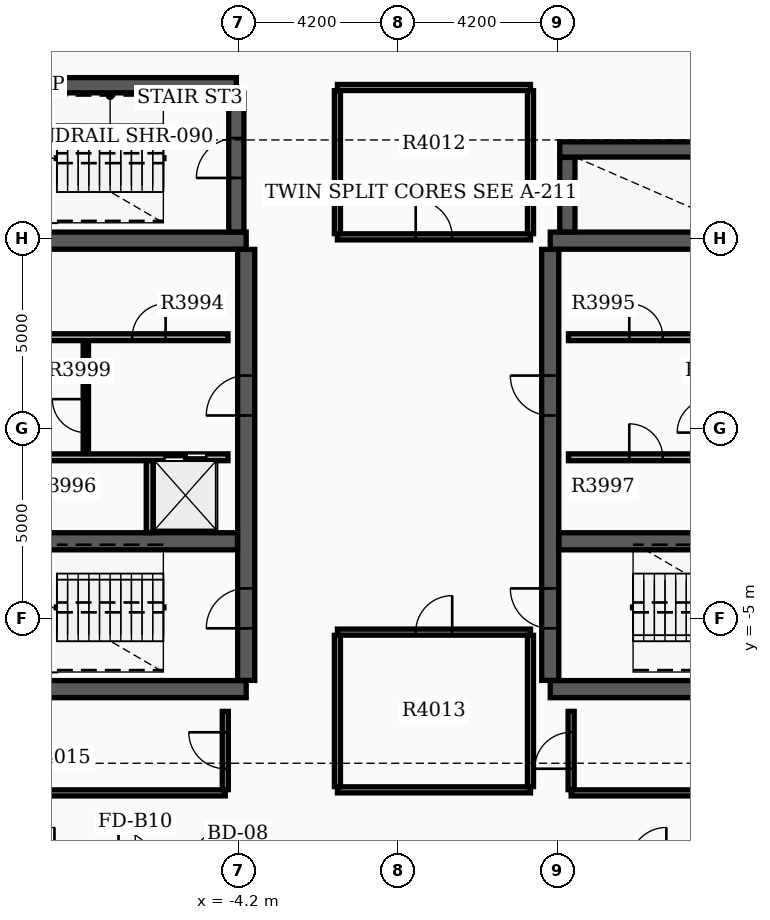
"""IFC4 building model, lengths in metres.
Left out: names, types, materials, properties, quantities, classifications, styles, units other than length and angle.
Written with IfcOpenShell. Run it as: python <this file> out.ifc"""

import sys

from ifc_helpers import new_model, si_unit, direction, frame, frame_2d, origin, place, context, subcontext, project, spatial, rectangle, extrude, element, fill, save


model = new_model("IFC4")
c1 = context("Model", 3, precision=1e-05, world=origin(), true_north=direction((0.0, 1.0)))
c2 = subcontext(c1, "Body", "Model", "MODEL_VIEW")
j1 = project(units=[si_unit("LENGTHUNIT", "METRE"), si_unit("PLANEANGLEUNIT", "RADIAN")], contexts=[c1])
p1 = place(None, origin())
s1 = spatial("IfcSite", under=j1, at=p1, CompositionType="ELEMENT")
p2 = place(p1, origin())
s2 = spatial("IfcBuilding", under=s1, at=p2, CompositionType="ELEMENT")
p3 = place(p2, frame((0.0, 0.0, 253.8)))
s3 = spatial("IfcBuildingStorey", under=s2, at=p3, CompositionType="ELEMENT", Elevation=253.8)
for number, where, z_axis, x_axis in (
    (1, (-12.4, -6.85, 0.0), (0.0, 0.0, 1.0), (1.0, 0.0, 0.0)),
    (2, (-12.4, 4.95, 0.0), (0.0, 0.0, 1.0), (1.0, 0.0, 0.0)),
):
    element("IfcWall", number, at=place(p3, frame(where, z_axis=z_axis, x_axis=x_axis)), inside=s3, PredefinedType="SHEAR", context=c2, shape_type="SweptSolid", body=[
        extrude(rectangle(XDim=8.4, YDim=0.45, at=frame_2d((4.2, 0.0))), origin(), (0.0, 0.0, 1.0), 3.7),
    ])
p4 = place(p3, frame((-4.0, -6.62, 0.0), z_axis=(0.0, 0.0, 1.0), x_axis=(0.0, 1.0, 0.0)))
e3 = element("IfcWall", 3, at=p4, inside=s3, PredefinedType="SHEAR", context=c2, shape_type="SweptSolid", body=[
    extrude(rectangle(XDim=11.34, YDim=0.45, at=frame_2d((5.67, 0.0))), origin(), (0.0, 0.0, 1.0), 3.7),
])
p5 = place(p4, frame((1.37, 0.0, 0.0)))
e4 = element("IfcOpeningElement", 4, at=p5, cuts=e3, PredefinedType="OPENING", context=c2, shape_type="SweptSolid", body=[
    extrude(rectangle(XDim=1.05, YDim=2.15, at=frame_2d((0.525, 1.075))), frame((0.0, 0.235, 0.0), z_axis=(0.0, -1.0, 0.0), x_axis=(1.0, 0.0, 0.0)), (0.0, 0.0, 1.0), 0.47),
])
p6 = place(p4, frame((6.97, 0.0, 0.0)))
e5 = element("IfcOpeningElement", 5, at=p6, cuts=e3, PredefinedType="OPENING", context=c2, shape_type="SweptSolid", body=[
    extrude(rectangle(XDim=1.05, YDim=2.15, at=frame_2d((0.525, 1.075))), frame((0.0, 0.235, 0.0), z_axis=(0.0, -1.0, 0.0), x_axis=(1.0, 0.0, 0.0)), (0.0, 0.0, 1.0), 0.47),
])
p7 = place(p3, frame((-12.17, -2.96, 0.0), z_axis=(0.0, 0.0, 1.0), x_axis=(1.0, 0.0, 0.0)))
e6 = element("IfcWall", 6, at=p7, inside=s3, PredefinedType="SHEAR", context=c2, shape_type="SweptSolid", body=[
    extrude(rectangle(XDim=7.94, YDim=0.45, at=frame_2d((3.97, 0.0))), origin(), (0.0, 0.0, 1.0), 3.7),
])
for number, where, z_axis, x_axis in (
    (7, (4.0, -6.85, 0.0), (0.0, 0.0, 1.0), (1.0, 0.0, 0.0)),
    (8, (4.0, 4.95, 0.0), (0.0, 0.0, 1.0), (1.0, 0.0, 0.0)),
):
    element("IfcWall", number, at=place(p3, frame(where, z_axis=z_axis, x_axis=x_axis)), inside=s3, PredefinedType="SHEAR", context=c2, shape_type="SweptSolid", body=[
        extrude(rectangle(XDim=8.4, YDim=0.45, at=frame_2d((4.2, 0.0))), origin(), (0.0, 0.0, 1.0), 3.7),
    ])
p8 = place(p3, frame((4.0, -6.62, 0.0), z_axis=(0.0, 0.0, 1.0), x_axis=(0.0, 1.0, 0.0)))
e9 = element("IfcWall", 9, at=p8, inside=s3, PredefinedType="SHEAR", context=c2, shape_type="SweptSolid", body=[
    extrude(rectangle(XDim=11.34, YDim=0.45, at=frame_2d((5.67, 0.0))), origin(), (0.0, 0.0, 1.0), 3.7),
])
p9 = place(p8, frame((1.37, 0.0, 0.0)))
e10 = element("IfcOpeningElement", 10, at=p9, cuts=e9, PredefinedType="OPENING", context=c2, shape_type="SweptSolid", body=[
    extrude(rectangle(XDim=1.05, YDim=2.15, at=frame_2d((0.525, 1.075))), frame((0.0, 0.235, 0.0), z_axis=(0.0, -1.0, 0.0), x_axis=(1.0, 0.0, 0.0)), (0.0, 0.0, 1.0), 0.47),
])
p10 = place(p8, frame((6.97, 0.0, 0.0)))
e11 = element("IfcOpeningElement", 11, at=p10, cuts=e9, PredefinedType="OPENING", context=c2, shape_type="SweptSolid", body=[
    extrude(rectangle(XDim=1.05, YDim=2.15, at=frame_2d((0.525, 1.075))), frame((0.0, 0.235, 0.0), z_axis=(0.0, -1.0, 0.0), x_axis=(1.0, 0.0, 0.0)), (0.0, 0.0, 1.0), 0.47),
])
p11 = place(p3, frame((4.23, -2.96, 0.0), z_axis=(0.0, 0.0, 1.0), x_axis=(1.0, 0.0, 0.0)))
e12 = element("IfcWall", 12, at=p11, inside=s3, PredefinedType="SHEAR", context=c2, shape_type="SweptSolid", body=[
    extrude(rectangle(XDim=7.94, YDim=0.45, at=frame_2d((3.97, 0.0))), origin(), (0.0, 0.0, 1.0), 3.7),
])
p12 = place(p3, frame((-12.22, 9.04, 0.0), z_axis=(0.0, 0.0, 1.0), x_axis=(1.0, 0.0, 0.0)))
e13 = element("IfcWall", 13, at=p12, inside=s3, PredefinedType="SHEAR", context=c2, shape_type="SweptSolid", body=[
    extrude(rectangle(XDim=7.96, YDim=0.4, at=frame_2d((3.98, 0.0))), origin(), (0.0, 0.0, 1.0), 3.7),
])
p13 = place(p3, frame((-4.26, 5.18, 0.0), z_axis=(0.0, 0.0, 1.0), x_axis=(0.0, 1.0, 0.0)))
e14 = element("IfcWall", 14, at=p13, inside=s3, PredefinedType="SHEAR", context=c2, shape_type="SweptSolid", body=[
    extrude(rectangle(XDim=3.655, YDim=0.4, at=frame_2d((1.828, 0.0))), origin(), (0.0, 0.0, 1.0), 3.7),
])
p14 = place(p13, frame((1.42, 0.0, 0.0)))
e15 = element("IfcOpeningElement", 15, at=p14, cuts=e14, PredefinedType="OPENING", context=c2, shape_type="SweptSolid", body=[
    extrude(rectangle(XDim=1.05, YDim=2.15, at=frame_2d((0.525, 1.075))), frame((0.0, 0.21, 0.0), z_axis=(0.0, -1.0, 0.0), x_axis=(1.0, 0.0, 0.0)), (0.0, 0.0, 1.0), 0.42),
])
p15 = place(p3, frame((4.45, 5.18, 0.0), z_axis=(0.0, 0.0, 1.0), x_axis=(0.0, 1.0, 0.0)))
e16 = element("IfcWall", 16, at=p15, inside=s3, PredefinedType="SHEAR", context=c2, shape_type="SweptSolid", body=[
    extrude(rectangle(XDim=1.96, YDim=0.4, at=frame_2d((0.98, 0.0))), origin(), (0.0, 0.0, 1.0), 3.7),
])
p16 = place(p3, frame((4.25, 7.35, 0.0), z_axis=(0.0, 0.0, 1.0), x_axis=(1.0, 0.0, 0.0)))
e17 = element("IfcWall", 17, at=p16, inside=s3, PredefinedType="SHEAR", context=c2, shape_type="SweptSolid", body=[
    extrude(rectangle(XDim=5.4, YDim=0.4, at=frame_2d((2.7, 0.0))), origin(), (0.0, 0.0, 1.0), 3.7),
])
p17 = place(p3, frame((-11.9, 2.41, 0.0), z_axis=(0.0, 0.0, 1.0), x_axis=(1.0, 0.0, 0.0)))
e18 = element("IfcWall", 18, at=p17, inside=s3, PredefinedType="SOLIDWALL", context=c2, shape_type="SweptSolid", body=[
    extrude(rectangle(XDim=7.42, YDim=0.18, at=frame_2d((3.71, 0.0))), origin(), (0.0, 0.0, 1.0), 3.17),
])
p18 = place(p17, frame((0.55, 0.0, 0.0)))
e19 = element("IfcOpeningElement", 19, at=p18, cuts=e18, PredefinedType="OPENING", context=c2, shape_type="SweptSolid", body=[
    extrude(rectangle(XDim=1.1, YDim=2.15, at=frame_2d((0.55, 1.075))), frame((0.0, 0.1, 0.0), z_axis=(0.0, -1.0, 0.0), x_axis=(1.0, 0.0, 0.0)), (0.0, 0.0, 1.0), 0.2),
])
p19 = place(p17, frame((4.9, 0.0, 0.0)))
e20 = element("IfcOpeningElement", 20, at=p19, cuts=e18, PredefinedType="OPENING", context=c2, shape_type="SweptSolid", body=[
    extrude(rectangle(XDim=0.88, YDim=2.1, at=frame_2d((0.44, 1.05))), frame((0.0, 0.1, 0.0), z_axis=(0.0, -1.0, 0.0), x_axis=(1.0, 0.0, 0.0)), (0.0, 0.0, 1.0), 0.2),
])
p20 = place(p3, frame((4.48, 2.41, 0.0), z_axis=(0.0, 0.0, 1.0), x_axis=(1.0, 0.0, 0.0)))
e21 = element("IfcWall", 21, at=p20, inside=s3, PredefinedType="SOLIDWALL", context=c2, shape_type="SweptSolid", body=[
    extrude(rectangle(XDim=7.42, YDim=0.18, at=frame_2d((3.71, 0.0))), origin(), (0.0, 0.0, 1.0), 3.17),
])
p21 = place(p20, frame((5.67, 0.0, 0.0)))
e22 = element("IfcOpeningElement", 22, at=p21, cuts=e21, PredefinedType="OPENING", context=c2, shape_type="SweptSolid", body=[
    extrude(rectangle(XDim=1.1, YDim=2.15, at=frame_2d((0.55, 1.075))), frame((0.0, 0.1, 0.0), z_axis=(0.0, -1.0, 0.0), x_axis=(1.0, 0.0, 0.0)), (0.0, 0.0, 1.0), 0.2),
])
p22 = place(p20, frame((1.6, 0.0, 0.0)))
e23 = element("IfcOpeningElement", 23, at=p22, cuts=e21, PredefinedType="OPENING", context=c2, shape_type="SweptSolid", body=[
    extrude(rectangle(XDim=0.88, YDim=2.1, at=frame_2d((0.44, 1.05))), frame((0.0, 0.1, 0.0), z_axis=(0.0, -1.0, 0.0), x_axis=(1.0, 0.0, 0.0)), (0.0, 0.0, 1.0), 0.2),
])
p23 = place(p3, frame((-11.9, -0.75, 0.0), z_axis=(0.0, 0.0, 1.0), x_axis=(1.0, 0.0, 0.0)))
e24 = element("IfcWall", 24, at=p23, inside=s3, PredefinedType="SOLIDWALL", context=c2, shape_type="SweptSolid", body=[
    extrude(rectangle(XDim=7.42, YDim=0.18, at=frame_2d((3.71, 0.0))), origin(), (0.0, 0.0, 1.0), 3.17),
])
p24 = place(p23, frame((5.75, 0.0, 0.0)))
e25 = element("IfcOpeningElement", 25, at=p24, cuts=e24, PredefinedType="OPENING", context=c2, shape_type="SweptSolid", body=[
    extrude(rectangle(XDim=1.1, YDim=2.15, at=frame_2d((0.55, 1.075))), frame((0.0, 0.1, 0.0), z_axis=(0.0, -1.0, 0.0), x_axis=(1.0, 0.0, 0.0)), (0.0, 0.0, 1.0), 0.2),
])
p25 = place(p23, frame((1.6, 0.0, 0.0)))
e26 = element("IfcOpeningElement", 26, at=p25, cuts=e24, PredefinedType="OPENING", context=c2, shape_type="SweptSolid", body=[
    extrude(rectangle(XDim=0.88, YDim=2.1, at=frame_2d((0.44, 1.05))), frame((0.0, 0.1, 0.0), z_axis=(0.0, -1.0, 0.0), x_axis=(1.0, 0.0, 0.0)), (0.0, 0.0, 1.0), 0.2),
])
p26 = place(p3, frame((4.48, -0.75, 0.0), z_axis=(0.0, 0.0, 1.0), x_axis=(1.0, 0.0, 0.0)))
e27 = element("IfcWall", 27, at=p26, inside=s3, PredefinedType="SOLIDWALL", context=c2, shape_type="SweptSolid", body=[
    extrude(rectangle(XDim=7.42, YDim=0.18, at=frame_2d((3.71, 0.0))), origin(), (0.0, 0.0, 1.0), 3.17),
])
p27 = place(p26, frame((3.92, 0.0, 0.0)))
e28 = element("IfcOpeningElement", 28, at=p27, cuts=e27, PredefinedType="OPENING", context=c2, shape_type="SweptSolid", body=[
    extrude(rectangle(XDim=1.1, YDim=2.15, at=frame_2d((0.55, 1.075))), frame((0.0, 0.1, 0.0), z_axis=(0.0, -1.0, 0.0), x_axis=(1.0, 0.0, 0.0)), (0.0, 0.0, 1.0), 0.2),
])
p28 = place(p26, frame((5.82, 0.0, 0.0)))
e29 = element("IfcOpeningElement", 29, at=p28, cuts=e27, PredefinedType="OPENING", context=c2, shape_type="SweptSolid", body=[
    extrude(rectangle(XDim=1.1, YDim=2.15, at=frame_2d((0.55, 1.075))), frame((0.0, 0.1, 0.0), z_axis=(0.0, -1.0, 0.0), x_axis=(1.0, 0.0, 0.0)), (0.0, 0.0, 1.0), 0.2),
])
p29 = place(p26, frame((1.6, 0.0, 0.0)))
e30 = element("IfcOpeningElement", 30, at=p29, cuts=e27, PredefinedType="OPENING", context=c2, shape_type="SweptSolid", body=[
    extrude(rectangle(XDim=0.88, YDim=2.1, at=frame_2d((0.44, 1.05))), frame((0.0, 0.1, 0.0), z_axis=(0.0, -1.0, 0.0), x_axis=(1.0, 0.0, 0.0)), (0.0, 0.0, 1.0), 0.2),
])
p30 = place(p3, frame((-6.54, -2.73, 0.0), z_axis=(0.0, 0.0, 1.0), x_axis=(0.0, 1.0, 0.0)))
e31 = element("IfcWall", 31, at=p30, inside=s3, PredefinedType="SOLIDWALL", context=c2, shape_type="SweptSolid", body=[
    extrude(rectangle(XDim=1.89, YDim=0.18, at=frame_2d((0.945, 0.0))), origin(), (0.0, 0.0, 1.0), 3.17),
])
p31 = place(p3, frame((-8.22, -0.65, 0.0), z_axis=(0.0, 0.0, 1.0), x_axis=(0.0, 1.0, 0.0)))
e32 = element("IfcWall", 32, at=p31, inside=s3, PredefinedType="SOLIDWALL", context=c2, shape_type="SweptSolid", body=[
    extrude(rectangle(XDim=2.96, YDim=0.14, at=frame_2d((1.48, 0.0))), origin(), (0.0, 0.0, 1.0), 3.17),
])
p32 = place(p31, frame((0.55, 0.0, 0.0)))
e33 = element("IfcOpeningElement", 33, at=p32, cuts=e32, PredefinedType="OPENING", context=c2, shape_type="SweptSolid", body=[
    extrude(rectangle(XDim=0.88, YDim=2.1, at=frame_2d((0.44, 1.05))), frame((0.0, 0.08, 0.0), z_axis=(0.0, -1.0, 0.0), x_axis=(1.0, 0.0, 0.0)), (0.0, 0.0, 1.0), 0.16),
])
p33 = place(p3, frame((-1.6, 5.05, 0.0), z_axis=(0.0, 0.0, 1.0), x_axis=(1.0, 0.0, 0.0)))
e34 = element("IfcWall", 34, at=p33, inside=s3, PredefinedType="PARTITIONING", context=c2, shape_type="SweptSolid", body=[
    extrude(rectangle(XDim=5.08, YDim=0.16, at=frame_2d((2.54, 0.0))), origin(), (0.0, 0.0, 1.0), 3.17),
])
p34 = place(p33, frame((2.06, 0.0, 0.0)))
e35 = element("IfcOpeningElement", 35, at=p34, cuts=e34, PredefinedType="OPENING", context=c2, shape_type="SweptSolid", body=[
    extrude(rectangle(XDim=0.96, YDim=2.15, at=frame_2d((0.48, 1.075))), frame((0.0, 0.09, 0.0), z_axis=(0.0, -1.0, 0.0), x_axis=(1.0, 0.0, 0.0)), (0.0, 0.0, 1.0), 0.18),
])
p35 = place(p3, frame((-1.6, 8.98, 0.0), z_axis=(0.0, 0.0, 1.0), x_axis=(1.0, 0.0, 0.0)))
e36 = element("IfcWall", 36, at=p35, inside=s3, PredefinedType="PARTITIONING", context=c2, shape_type="SweptSolid", body=[
    extrude(rectangle(XDim=5.08, YDim=0.16, at=frame_2d((2.54, 0.0))), origin(), (0.0, 0.0, 1.0), 3.17),
])
for number, where, z_axis, x_axis in (
    (37, (-1.6, 5.135, 0.0), (0.0, 0.0, 1.0), (0.0, 1.0, 0.0)),
    (38, (3.48, 5.135, 0.0), (0.0, 0.0, 1.0), (0.0, 1.0, 0.0)),
):
    element("IfcWall", number, at=place(p3, frame(where, z_axis=z_axis, x_axis=x_axis)), inside=s3, PredefinedType="PARTITIONING", context=c2, shape_type="SweptSolid", body=[
        extrude(rectangle(XDim=3.76, YDim=0.16, at=frame_2d((1.88, 0.0))), origin(), (0.0, 0.0, 1.0), 3.17),
    ])
p36 = place(p3, frame((-1.6, -9.5, 0.0), z_axis=(0.0, 0.0, 1.0), x_axis=(1.0, 0.0, 0.0)))
e39 = element("IfcWall", 39, at=p36, inside=s3, PredefinedType="PARTITIONING", context=c2, shape_type="SweptSolid", body=[
    extrude(rectangle(XDim=5.08, YDim=0.16, at=frame_2d((2.54, 0.0))), origin(), (0.0, 0.0, 1.0), 3.17),
])
p37 = place(p3, frame((-1.6, -5.35, 0.0), z_axis=(0.0, 0.0, 1.0), x_axis=(1.0, 0.0, 0.0)))
e40 = element("IfcWall", 40, at=p37, inside=s3, PredefinedType="PARTITIONING", context=c2, shape_type="SweptSolid", body=[
    extrude(rectangle(XDim=5.08, YDim=0.16, at=frame_2d((2.54, 0.0))), origin(), (0.0, 0.0, 1.0), 3.17),
])
p38 = place(p37, frame((2.06, 0.0, 0.0)))
e41 = element("IfcOpeningElement", 41, at=p38, cuts=e40, PredefinedType="OPENING", context=c2, shape_type="SweptSolid", body=[
    extrude(rectangle(XDim=0.96, YDim=2.15, at=frame_2d((0.48, 1.075))), frame((0.0, 0.09, 0.0), z_axis=(0.0, -1.0, 0.0), x_axis=(1.0, 0.0, 0.0)), (0.0, 0.0, 1.0), 0.18),
])
for number, where, z_axis, x_axis in (
    (42, (-1.6, -9.415, 0.0), (0.0, 0.0, 1.0), (0.0, 1.0, 0.0)),
    (43, (3.48, -9.415, 0.0), (0.0, 0.0, 1.0), (0.0, 1.0, 0.0)),
):
    element("IfcWall", number, at=place(p3, frame(where, z_axis=z_axis, x_axis=x_axis)), inside=s3, PredefinedType="PARTITIONING", context=c2, shape_type="SweptSolid", body=[
        extrude(rectangle(XDim=3.98, YDim=0.16, at=frame_2d((1.99, 0.0))), origin(), (0.0, 0.0, 1.0), 3.17),
    ])
p39 = place(p3, frame((4.55, -9.58, 0.0), z_axis=(0.0, 0.0, 1.0), x_axis=(1.0, 0.0, 0.0)))
e44 = element("IfcWall", 44, at=p39, inside=s3, PredefinedType="PARTITIONING", context=c2, shape_type="SweptSolid", body=[
    extrude(rectangle(XDim=8.1, YDim=0.16, at=frame_2d((4.05, 0.0))), origin(), (0.0, 0.0, 1.0), 3.17),
])
p40 = place(p3, frame((4.55, -9.495, 0.0), z_axis=(0.0, 0.0, 1.0), x_axis=(0.0, 1.0, 0.0)))
e45 = element("IfcWall", 45, at=p40, inside=s3, PredefinedType="PARTITIONING", context=c2, shape_type="SweptSolid", body=[
    extrude(rectangle(XDim=2.06, YDim=0.16, at=frame_2d((1.03, 0.0))), origin(), (0.0, 0.0, 1.0), 3.17),
])
p41 = place(p40, frame((0.55, 0.0, 0.0)))
e46 = element("IfcOpeningElement", 46, at=p41, cuts=e45, PredefinedType="OPENING", context=c2, shape_type="SweptSolid", body=[
    extrude(rectangle(XDim=0.96, YDim=2.15, at=frame_2d((0.48, 1.075))), frame((0.0, 0.09, 0.0), z_axis=(0.0, -1.0, 0.0), x_axis=(1.0, 0.0, 0.0)), (0.0, 0.0, 1.0), 0.18),
])
p42 = place(p3, frame((-12.65, -9.58, 0.0), z_axis=(0.0, 0.0, 1.0), x_axis=(1.0, 0.0, 0.0)))
e47 = element("IfcWall", 47, at=p42, inside=s3, PredefinedType="PARTITIONING", context=c2, shape_type="SweptSolid", body=[
    extrude(rectangle(XDim=8.1, YDim=0.16, at=frame_2d((4.05, 0.0))), origin(), (0.0, 0.0, 1.0), 3.17),
])
p43 = place(p3, frame((-4.55, -9.495, 0.0), z_axis=(0.0, 0.0, 1.0), x_axis=(0.0, 1.0, 0.0)))
e48 = element("IfcWall", 48, at=p43, inside=s3, PredefinedType="PARTITIONING", context=c2, shape_type="SweptSolid", body=[
    extrude(rectangle(XDim=2.06, YDim=0.16, at=frame_2d((1.03, 0.0))), origin(), (0.0, 0.0, 1.0), 3.17),
])
p44 = place(p43, frame((0.55, 0.0, 0.0)))
e49 = element("IfcOpeningElement", 49, at=p44, cuts=e48, PredefinedType="OPENING", context=c2, shape_type="SweptSolid", body=[
    extrude(rectangle(XDim=0.96, YDim=2.15, at=frame_2d((0.48, 1.075))), frame((0.0, 0.09, 0.0), z_axis=(0.0, -1.0, 0.0), x_axis=(1.0, 0.0, 0.0)), (0.0, 0.0, 1.0), 0.18),
])
p45 = place(p5, origin())
e50 = element("IfcDoor", 50, at=p45, inside=s3, OperationType="SINGLE_SWING_LEFT", PredefinedType="DOOR", context=c2, shape_type="SweptSolid", body=[
    extrude(rectangle(XDim=1.05, YDim=2.15, at=frame_2d((0.525, 1.075))), frame((0.0, 0.025, 0.0), z_axis=(0.0, -1.0, 0.0), x_axis=(1.0, 0.0, 0.0)), (0.0, 0.0, 1.0), 0.05),
])
fill(e4, e50)
p46 = place(p9, origin())
e51 = element("IfcDoor", 51, at=p46, inside=s3, OperationType="SINGLE_SWING_RIGHT", PredefinedType="DOOR", context=c2, shape_type="SweptSolid", body=[
    extrude(rectangle(XDim=1.05, YDim=2.15, at=frame_2d((0.525, 1.075))), frame((0.0, 0.025, 0.0), z_axis=(0.0, -1.0, 0.0), x_axis=(1.0, 0.0, 0.0)), (0.0, 0.0, 1.0), 0.05),
])
fill(e10, e51)
p47 = place(p6, origin())
e52 = element("IfcDoor", 52, at=p47, inside=s3, OperationType="SINGLE_SWING_LEFT", PredefinedType="DOOR", context=c2, shape_type="SweptSolid", body=[
    extrude(rectangle(XDim=1.05, YDim=2.15, at=frame_2d((0.525, 1.075))), frame((0.0, 0.025, 0.0), z_axis=(0.0, -1.0, 0.0), x_axis=(1.0, 0.0, 0.0)), (0.0, 0.0, 1.0), 0.05),
])
fill(e5, e52)
p48 = place(p10, origin())
e53 = element("IfcDoor", 53, at=p48, inside=s3, OperationType="SINGLE_SWING_RIGHT", PredefinedType="DOOR", context=c2, shape_type="SweptSolid", body=[
    extrude(rectangle(XDim=1.05, YDim=2.15, at=frame_2d((0.525, 1.075))), frame((0.0, 0.025, 0.0), z_axis=(0.0, -1.0, 0.0), x_axis=(1.0, 0.0, 0.0)), (0.0, 0.0, 1.0), 0.05),
])
fill(e11, e53)
p49 = place(p14, origin())
e54 = element("IfcDoor", 54, at=p49, inside=s3, OperationType="SINGLE_SWING_LEFT", PredefinedType="DOOR", context=c2, shape_type="SweptSolid", body=[
    extrude(rectangle(XDim=1.05, YDim=2.15, at=frame_2d((0.525, 1.075))), frame((0.0, 0.025, 0.0), z_axis=(0.0, -1.0, 0.0), x_axis=(1.0, 0.0, 0.0)), (0.0, 0.0, 1.0), 0.05),
])
fill(e15, e54)
p50 = place(p24, origin())
e55 = element("IfcDoor", 55, at=p50, inside=s3, OperationType="DOUBLE_DOOR_SLIDING", PredefinedType="DOOR", context=c2, shape_type="SweptSolid", body=[
    extrude(rectangle(XDim=1.1, YDim=2.15, at=frame_2d((0.55, 1.075))), frame((0.0, 0.025, 0.0), z_axis=(0.0, -1.0, 0.0), x_axis=(1.0, 0.0, 0.0)), (0.0, 0.0, 1.0), 0.05),
])
fill(e25, e55)
p51 = place(p19, origin())
e56 = element("IfcDoor", 56, at=p51, inside=s3, OperationType="SINGLE_SWING_RIGHT", PredefinedType="DOOR", context=c2, shape_type="SweptSolid", body=[
    extrude(rectangle(XDim=0.88, YDim=2.1, at=frame_2d((0.44, 1.05))), frame((0.0, 0.025, 0.0), z_axis=(0.0, -1.0, 0.0), x_axis=(1.0, 0.0, 0.0)), (0.0, 0.0, 1.0), 0.05),
])
fill(e20, e56)
p52 = place(p22, origin())
e57 = element("IfcDoor", 57, at=p52, inside=s3, OperationType="SINGLE_SWING_LEFT", PredefinedType="DOOR", context=c2, shape_type="SweptSolid", body=[
    extrude(rectangle(XDim=0.88, YDim=2.1, at=frame_2d((0.44, 1.05))), frame((0.0, 0.025, 0.0), z_axis=(0.0, -1.0, 0.0), x_axis=(1.0, 0.0, 0.0)), (0.0, 0.0, 1.0), 0.05),
])
fill(e23, e57)
p53 = place(p29, origin())
e58 = element("IfcDoor", 58, at=p53, inside=s3, OperationType="SINGLE_SWING_LEFT", PredefinedType="DOOR", context=c2, shape_type="SweptSolid", body=[
    extrude(rectangle(XDim=0.88, YDim=2.1, at=frame_2d((0.44, 1.05))), frame((0.0, 0.025, 0.0), z_axis=(0.0, -1.0, 0.0), x_axis=(1.0, 0.0, 0.0)), (0.0, 0.0, 1.0), 0.05),
])
fill(e30, e58)
p54 = place(p32, origin())
e59 = element("IfcDoor", 59, at=p54, inside=s3, OperationType="SINGLE_SWING_RIGHT", PredefinedType="DOOR", context=c2, shape_type="SweptSolid", body=[
    extrude(rectangle(XDim=0.88, YDim=2.1, at=frame_2d((0.44, 1.05))), frame((0.0, 0.025, 0.0), z_axis=(0.0, -1.0, 0.0), x_axis=(1.0, 0.0, 0.0)), (0.0, 0.0, 1.0), 0.05),
])
fill(e33, e59)
p55 = place(p34, origin())
e60 = element("IfcDoor", 60, at=p55, inside=s3, OperationType="SINGLE_SWING_LEFT", PredefinedType="DOOR", context=c2, shape_type="SweptSolid", body=[
    extrude(rectangle(XDim=0.96, YDim=2.15, at=frame_2d((0.48, 1.075))), frame((0.0, 0.025, 0.0), z_axis=(0.0, -1.0, 0.0), x_axis=(1.0, 0.0, 0.0)), (0.0, 0.0, 1.0), 0.05),
])
fill(e35, e60)
p56 = place(p38, origin())
e61 = element("IfcDoor", 61, at=p56, inside=s3, OperationType="SINGLE_SWING_RIGHT", PredefinedType="DOOR", context=c2, shape_type="SweptSolid", body=[
    extrude(rectangle(XDim=0.96, YDim=2.15, at=frame_2d((0.48, 1.075))), frame((0.0, 0.025, 0.0), z_axis=(0.0, -1.0, 0.0), x_axis=(1.0, 0.0, 0.0)), (0.0, 0.0, 1.0), 0.05),
])
fill(e41, e61)
p57 = place(p41, origin())
e62 = element("IfcDoor", 62, at=p57, inside=s3, OperationType="SINGLE_SWING_LEFT", PredefinedType="DOOR", context=c2, shape_type="SweptSolid", body=[
    extrude(rectangle(XDim=0.96, YDim=2.15, at=frame_2d((0.48, 1.075))), frame((0.0, 0.025, 0.0), z_axis=(0.0, -1.0, 0.0), x_axis=(1.0, 0.0, 0.0)), (0.0, 0.0, 1.0), 0.05),
])
fill(e46, e62)
p58 = place(p44, origin())
e63 = element("IfcDoor", 63, at=p58, inside=s3, OperationType="SINGLE_SWING_RIGHT", PredefinedType="DOOR", context=c2, shape_type="SweptSolid", body=[
    extrude(rectangle(XDim=0.96, YDim=2.15, at=frame_2d((0.48, 1.075))), frame((0.0, 0.025, 0.0), z_axis=(0.0, -1.0, 0.0), x_axis=(1.0, 0.0, 0.0)), (0.0, 0.0, 1.0), 0.05),
])
fill(e49, e63)
save(model, sys.argv[1])
